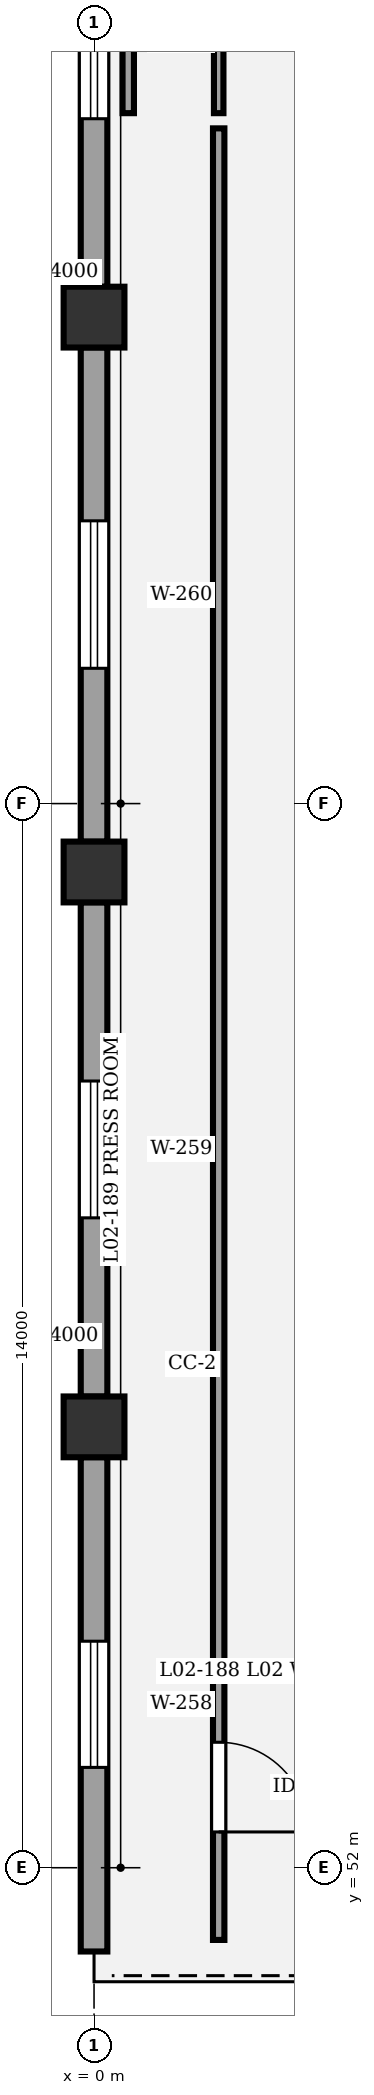
"""IFC4 building model, lengths in metres.
Left out: names, types, materials, properties, quantities, classifications, styles, units other than length and angle.
Written with IfcOpenShell. Run it as: python <this file> out.ifc"""

import sys

from ifc_helpers import new_model, si_unit, direction, frame, frame_2d, origin, origin_2d, place, context, subcontext, project, spatial, rectangle, circle, extrude, element, fill, save


model = new_model("IFC4")
c1 = context("Model", 3, precision=1e-05, world=origin(), true_north=direction((0.0, 1.0)))
c2 = subcontext(c1, "Body", "Model", "MODEL_VIEW")
j1 = project(units=[si_unit("LENGTHUNIT", "METRE"), si_unit("PLANEANGLEUNIT", "RADIAN")], contexts=[c1])
p1 = place(None, origin())
s1 = spatial("IfcSite", under=j1, at=p1, CompositionType="ELEMENT")
p2 = place(p1, origin())
s2 = spatial("IfcBuilding", under=s1, at=p2, CompositionType="ELEMENT")
p3 = place(p2, frame((0.0, 0.0, 10.2)))
s3 = spatial("IfcBuildingStorey", under=s2, at=p3, CompositionType="ELEMENT", Elevation=10.2)
for number, where, z_axis, x_axis in (
    (1, (0.0, 57.8, 0.0), (0.0, 0.0, 1.0), (1.0, 0.0, 0.0)),
    (2, (0.0, 65.1, 0.0), (0.0, 0.0, 1.0), (1.0, 0.0, 0.0)),
    (3, (0.0, 72.4, 0.0), (0.0, 0.0, 1.0), (1.0, 0.0, 0.0)),
):
    element("IfcColumn", number, at=place(p3, frame(where, z_axis=z_axis, x_axis=x_axis)), inside=s3, PredefinedType="COLUMN", context=c2, shape_type="SweptSolid", body=[
        extrude(circle(Radius=0.4, at=origin_2d()), origin(), (0.0, 0.0, 1.0), 4.5),
    ])
p4 = place(p3, frame((0.0, 50.898, 0.0), z_axis=(0.0, 0.0, 1.0), x_axis=(0.0, 1.0, 0.0)))
e4 = element("IfcWall", 4, at=p4, inside=s3, PredefinedType="STANDARD", context=c2, shape_type="SweptSolid", body=[
    extrude(rectangle(XDim=6.504, YDim=0.35, at=frame_2d((3.252, 0.0))), origin(), (0.0, 0.0, 1.0), 3.26),
])
p5 = place(p4, frame((2.422, 0.0, 0.9)))
e5 = element("IfcOpeningElement", 5, at=p5, cuts=e4, PredefinedType="OPENING", context=c2, shape_type="SweptSolid", body=[
    extrude(rectangle(XDim=1.66, YDim=2.15, at=frame_2d((0.83, 1.075))), frame((0.0, 0.185, 0.0), z_axis=(0.0, -1.0, 0.0), x_axis=(1.0, 0.0, 0.0)), (0.0, 0.0, 1.0), 0.37),
])
p6 = place(p3, frame((0.0, 58.198, 0.0), z_axis=(0.0, 0.0, 1.0), x_axis=(0.0, 1.0, 0.0)))
e6 = element("IfcWall", 6, at=p6, inside=s3, PredefinedType="STANDARD", context=c2, shape_type="SweptSolid", body=[
    extrude(rectangle(XDim=6.504, YDim=0.35, at=frame_2d((3.252, 0.0))), origin(), (0.0, 0.0, 1.0), 3.26),
])
p7 = place(p6, frame((2.352, 0.0, 0.9)))
e7 = element("IfcOpeningElement", 7, at=p7, cuts=e6, PredefinedType="OPENING", context=c2, shape_type="SweptSolid", body=[
    extrude(rectangle(XDim=1.8, YDim=2.15, at=frame_2d((0.9, 1.075))), frame((0.0, 0.185, 0.0), z_axis=(0.0, -1.0, 0.0), x_axis=(1.0, 0.0, 0.0)), (0.0, 0.0, 1.0), 0.37),
])
p8 = place(p3, frame((0.0, 65.498, 0.0), z_axis=(0.0, 0.0, 1.0), x_axis=(0.0, 1.0, 0.0)))
e8 = element("IfcWall", 8, at=p8, inside=s3, PredefinedType="STANDARD", context=c2, shape_type="SweptSolid", body=[
    extrude(rectangle(XDim=6.504, YDim=0.35, at=frame_2d((3.252, 0.0))), origin(), (0.0, 0.0, 1.0), 3.26),
])
p9 = place(p8, frame((2.282, 0.0, 0.9)))
e9 = element("IfcOpeningElement", 9, at=p9, cuts=e8, PredefinedType="OPENING", context=c2, shape_type="SweptSolid", body=[
    extrude(rectangle(XDim=1.94, YDim=2.15, at=frame_2d((0.97, 1.075))), frame((0.0, 0.185, 0.0), z_axis=(0.0, -1.0, 0.0), x_axis=(1.0, 0.0, 0.0)), (0.0, 0.0, 1.0), 0.37),
])
p10 = place(p3, frame((0.0, 72.798, 0.0), z_axis=(0.0, 0.0, 1.0), x_axis=(0.0, 1.0, 0.0)))
e10 = element("IfcWall", 10, at=p10, inside=s3, PredefinedType="STANDARD", context=c2, shape_type="SweptSolid", body=[
    extrude(rectangle(XDim=6.504, YDim=0.35, at=frame_2d((3.252, 0.0))), origin(), (0.0, 0.0, 1.0), 3.26),
])
p11 = place(p10, frame((2.212, 0.0, 0.9)))
e11 = element("IfcOpeningElement", 11, at=p11, cuts=e10, PredefinedType="OPENING", context=c2, shape_type="SweptSolid", body=[
    extrude(rectangle(XDim=2.08, YDim=2.15, at=frame_2d((1.04, 1.075))), frame((0.0, 0.185, 0.0), z_axis=(0.0, -1.0, 0.0), x_axis=(1.0, 0.0, 0.0)), (0.0, 0.0, 1.0), 0.37),
])
p12 = place(p3, frame((1.64, 74.883, 0.0), z_axis=(0.0, 0.0, 1.0), x_axis=(0.0, -1.0, 0.0)))
e12 = element("IfcWall", 12, at=p12, inside=s3, PredefinedType="PARTITIONING", context=c2, shape_type="SweptSolid", body=[
    extrude(rectangle(XDim=23.833, YDim=0.15, at=frame_2d((11.917, 0.0))), origin(), (0.0, 0.0, 1.0), 3.25),
])
p13 = place(p12, frame((21.233, 0.0, 0.0)))
e13 = element("IfcOpeningElement", 13, at=p13, cuts=e12, PredefinedType="OPENING", context=c2, shape_type="SweptSolid", body=[
    extrude(rectangle(XDim=1.18, YDim=2.1, at=frame_2d((0.59, 1.05))), frame((0.0, 0.085, 0.0), z_axis=(0.0, -1.0, 0.0), x_axis=(1.0, 0.0, 0.0)), (0.0, 0.0, 1.0), 0.17),
])
p14 = place(p3, frame((1.64, 98.917, 0.0), z_axis=(0.0, 0.0, 1.0), x_axis=(0.0, -1.0, 0.0)))
e14 = element("IfcWall", 14, at=p14, inside=s3, PredefinedType="PARTITIONING", context=c2, shape_type="SweptSolid", body=[
    extrude(rectangle(XDim=23.833, YDim=0.125, at=frame_2d((11.917, 0.0))), origin(), (0.0, 0.0, 1.0), 3.25),
])
p15 = place(p14, frame((8.011, 0.0, 0.0)))
e15 = element("IfcOpeningElement", 15, at=p15, cuts=e14, PredefinedType="OPENING", context=c2, shape_type="SweptSolid", body=[
    extrude(rectangle(XDim=1.22, YDim=2.1, at=frame_2d((0.61, 1.05))), frame((0.0, 0.073, 0.0), z_axis=(0.0, -1.0, 0.0), x_axis=(1.0, 0.0, 0.0)), (0.0, 0.0, 1.0), 0.145),
])
p16 = place(p3, frame((0.45, 75.083, 0.0), z_axis=(0.0, 0.0, 1.0), x_axis=(0.0, 1.0, 0.0)))
e16 = element("IfcWall", 16, at=p16, inside=s3, PredefinedType="PARTITIONING", context=c2, shape_type="SweptSolid", body=[
    extrude(rectangle(XDim=23.833, YDim=0.15, at=frame_2d((11.917, 0.0))), origin(), (0.0, 0.0, 1.0), 3.25),
])
p17 = place(p5, origin())
e17 = element("IfcWindow", 17, at=p17, inside=s3, PartitioningType="SINGLE_PANEL", PredefinedType="WINDOW", context=c2, shape_type="SweptSolid", body=[
    extrude(rectangle(XDim=1.66, YDim=2.15, at=frame_2d((0.83, 1.075))), frame((0.0, 0.03, 0.0), z_axis=(0.0, -1.0, 0.0), x_axis=(1.0, 0.0, 0.0)), (0.0, 0.0, 1.0), 0.06),
])
fill(e5, e17)
p18 = place(p7, origin())
e18 = element("IfcWindow", 18, at=p18, inside=s3, PartitioningType="SINGLE_PANEL", PredefinedType="WINDOW", context=c2, shape_type="SweptSolid", body=[
    extrude(rectangle(XDim=1.8, YDim=2.15, at=frame_2d((0.9, 1.075))), frame((0.0, 0.03, 0.0), z_axis=(0.0, -1.0, 0.0), x_axis=(1.0, 0.0, 0.0)), (0.0, 0.0, 1.0), 0.06),
])
fill(e7, e18)
p19 = place(p9, origin())
e19 = element("IfcWindow", 19, at=p19, inside=s3, PartitioningType="SINGLE_PANEL", PredefinedType="WINDOW", context=c2, shape_type="SweptSolid", body=[
    extrude(rectangle(XDim=1.94, YDim=2.15, at=frame_2d((0.97, 1.075))), frame((0.0, 0.03, 0.0), z_axis=(0.0, -1.0, 0.0), x_axis=(1.0, 0.0, 0.0)), (0.0, 0.0, 1.0), 0.06),
])
fill(e9, e19)
p20 = place(p11, origin())
e20 = element("IfcWindow", 20, at=p20, inside=s3, PartitioningType="SINGLE_PANEL", PredefinedType="WINDOW", context=c2, shape_type="SweptSolid", body=[
    extrude(rectangle(XDim=2.08, YDim=2.15, at=frame_2d((1.04, 1.075))), frame((0.0, 0.03, 0.0), z_axis=(0.0, -1.0, 0.0), x_axis=(1.0, 0.0, 0.0)), (0.0, 0.0, 1.0), 0.06),
])
fill(e11, e20)
p21 = place(p13, origin())
e21 = element("IfcDoor", 21, at=p21, inside=s3, OperationType="SINGLE_SWING_RIGHT", PredefinedType="DOOR", context=c2, shape_type="SweptSolid", body=[
    extrude(rectangle(XDim=1.18, YDim=2.1, at=frame_2d((0.59, 1.05))), frame((0.0, 0.025, 0.0), z_axis=(0.0, -1.0, 0.0), x_axis=(1.0, 0.0, 0.0)), (0.0, 0.0, 1.0), 0.05),
])
fill(e13, e21)
save(model, sys.argv[1])
